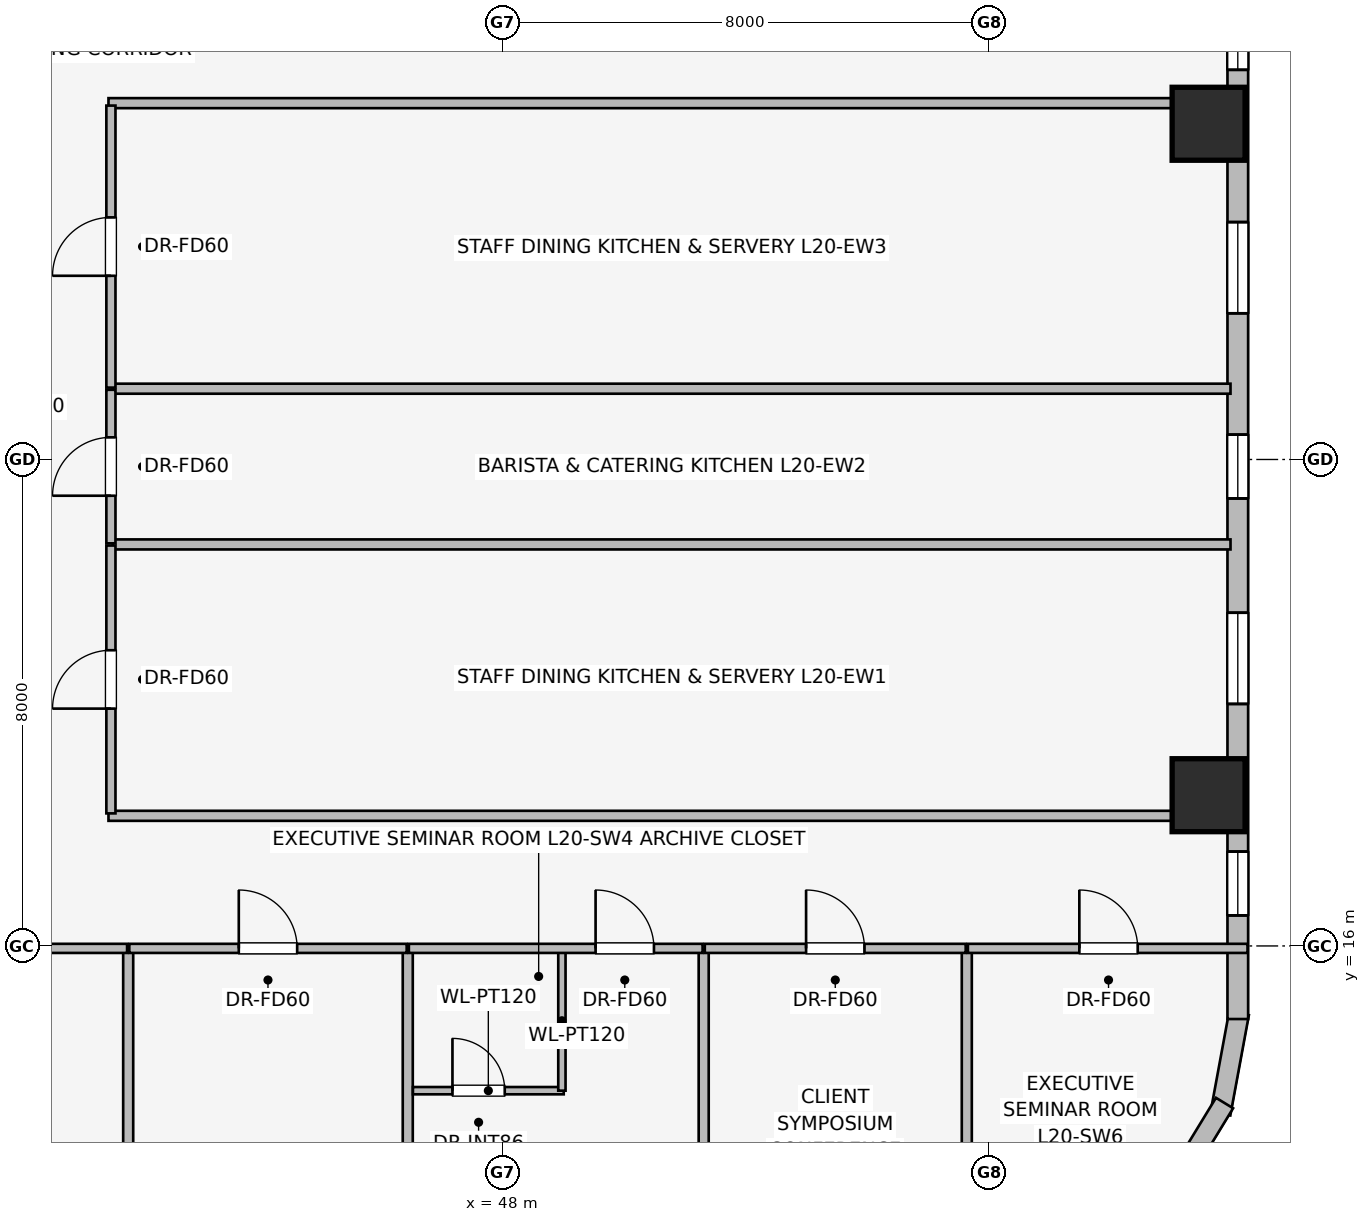
"""IFC4 building model, lengths in metres.
Left out: names, types, materials, properties, quantities, classifications, styles, units other than length and angle.
Written with IfcOpenShell. Run it as: python <this file> out.ifc"""

import sys

from ifc_helpers import new_model, si_unit, direction, frame, frame_2d, origin, origin_2d, place, context, subcontext, project, spatial, rectangle, extrude, element, fill, save


model = new_model("IFC4")
c1 = context("Model", 3, precision=1e-05, world=origin(), true_north=direction((0.0, 1.0)))
c2 = subcontext(c1, "Body", "Model", "MODEL_VIEW")
j1 = project(units=[si_unit("LENGTHUNIT", "METRE"), si_unit("PLANEANGLEUNIT", "RADIAN")], contexts=[c1])
p1 = place(None, origin())
s1 = spatial("IfcSite", under=j1, at=p1, CompositionType="ELEMENT")
p2 = place(p1, origin())
s2 = spatial("IfcBuilding", under=s1, at=p2, CompositionType="ELEMENT")
p3 = place(p2, frame((0.0, 0.0, 78.1)))
s3 = spatial("IfcBuildingStorey", under=s2, at=p3, CompositionType="ELEMENT", Elevation=78.1)
for number, where, z_axis, x_axis in (
    (1, (59.613, 18.479, 0.0), (0.0, 0.0, 1.0), (1.0, 0.0, 0.0)),
    (2, (59.613, 29.521, 0.0), (0.0, 0.0, 1.0), (1.0, 0.0, 0.0)),
):
    element("IfcColumn", number, at=place(p3, frame(where, z_axis=z_axis, x_axis=x_axis)), inside=s3, PredefinedType="COLUMN", context=c2, shape_type="SweptSolid", body=[
        extrude(rectangle(XDim=1.2, YDim=1.2, at=origin_2d()), origin(), (0.0, 0.0, 1.0), 3.65),
    ])
p4 = place(p3, frame((60.113, 14.892, 0.0), z_axis=(0.0, 0.0, 1.0), x_axis=(-0.181714143354, -0.983351397063, 0.0)))
e3 = element("IfcWall", 3, at=p4, inside=s3, PredefinedType="STANDARD", context=c2, shape_type="SweptSolid", body=[
    extrude(rectangle(XDim=1.678, YDim=0.33, at=frame_2d((0.839, 0.0))), origin(), (0.0, 0.0, 1.0), 3.39),
])
p5 = place(p3, frame((59.875, 13.417, 0.0), z_axis=(0.0, 0.0, 1.0), x_axis=(-0.520584129191, -0.853810379671, 0.0)))
e4 = element("IfcWall", 4, at=p5, inside=s3, PredefinedType="STANDARD", context=c2, shape_type="SweptSolid", body=[
    extrude(rectangle(XDim=1.677, YDim=0.33, at=frame_2d((0.838, 0.0))), origin(), (0.0, 0.0, 1.0), 3.39),
])
p6 = place(p3, frame((60.093, 33.202, 0.0), z_axis=(0.0, 0.0, 1.0), x_axis=(0.0, -1.0, 0.0)))
e5 = element("IfcWall", 5, at=p6, inside=s3, PredefinedType="STANDARD", context=c2, shape_type="SweptSolid", body=[
    extrude(rectangle(XDim=18.404, YDim=0.34, at=frame_2d((9.202, 0.0))), origin(), (0.0, 0.0, 1.0), 2.684),
])
p7 = place(p6, frame((1.744, 0.0, 0.75)))
e6 = element("IfcOpeningElement", 6, at=p7, cuts=e5, PredefinedType="OPENING", context=c2, shape_type="SweptSolid", body=[
    extrude(rectangle(XDim=1.05, YDim=1.4, at=frame_2d((0.525, 0.7))), frame((0.0, 0.18, 0.0), z_axis=(0.0, -1.0, 0.0), x_axis=(1.0, 0.0, 0.0)), (0.0, 0.0, 1.0), 0.36),
])
p8 = place(p6, frame((5.298, 0.0, 0.75)))
e7 = element("IfcOpeningElement", 7, at=p8, cuts=e5, PredefinedType="OPENING", context=c2, shape_type="SweptSolid", body=[
    extrude(rectangle(XDim=1.5, YDim=1.5, at=frame_2d((0.75, 0.75))), frame((0.0, 0.18, 0.0), z_axis=(0.0, -1.0, 0.0), x_axis=(1.0, 0.0, 0.0)), (0.0, 0.0, 1.0), 0.36),
])
p9 = place(p6, frame((8.793, 0.0, 0.75)))
e8 = element("IfcOpeningElement", 8, at=p9, cuts=e5, PredefinedType="OPENING", context=c2, shape_type="SweptSolid", body=[
    extrude(rectangle(XDim=1.05, YDim=1.4, at=frame_2d((0.525, 0.7))), frame((0.0, 0.18, 0.0), z_axis=(0.0, -1.0, 0.0), x_axis=(1.0, 0.0, 0.0)), (0.0, 0.0, 1.0), 0.36),
])
p10 = place(p6, frame((11.722, 0.0, 0.75)))
e9 = element("IfcOpeningElement", 9, at=p10, cuts=e5, PredefinedType="OPENING", context=c2, shape_type="SweptSolid", body=[
    extrude(rectangle(XDim=1.5, YDim=1.5, at=frame_2d((0.75, 0.75))), frame((0.0, 0.18, 0.0), z_axis=(0.0, -1.0, 0.0), x_axis=(1.0, 0.0, 0.0)), (0.0, 0.0, 1.0), 0.36),
])
p11 = place(p6, frame((15.65, 0.0, 0.75)))
e10 = element("IfcOpeningElement", 10, at=p11, cuts=e5, PredefinedType="OPENING", context=c2, shape_type="SweptSolid", body=[
    extrude(rectangle(XDim=1.05, YDim=1.4, at=frame_2d((0.525, 0.7))), frame((0.0, 0.18, 0.0), z_axis=(0.0, -1.0, 0.0), x_axis=(1.0, 0.0, 0.0)), (0.0, 0.0, 1.0), 0.36),
])
for number, where, z_axis, x_axis in (
    (11, (41.52, 18.14, 0.0), (0.0, 0.0, 1.0), (1.0, 0.0, 0.0)),
    (12, (41.52, 29.86, 0.0), (0.0, 0.0, 1.0), (1.0, 0.0, 0.0)),
):
    element("IfcWall", number, at=place(p3, frame(where, z_axis=z_axis, x_axis=x_axis)), inside=s3, PredefinedType="PARTITIONING", context=c2, shape_type="SweptSolid", body=[
        extrude(rectangle(XDim=18.453, YDim=0.165, at=frame_2d((9.227, 0.0))), origin(), (0.0, 0.0, 1.0), 3.39),
    ])
for number, where, z_axis, x_axis in (
    (13, (41.59, 22.603, 0.0), (0.0, 0.0, 1.0), (1.0, 0.0, 0.0)),
    (14, (41.59, 25.164, 0.0), (0.0, 0.0, 1.0), (1.0, 0.0, 0.0)),
):
    element("IfcWall", number, at=place(p3, frame(where, z_axis=z_axis, x_axis=x_axis)), inside=s3, PredefinedType="PARTITIONING", context=c2, shape_type="SweptSolid", body=[
        extrude(rectangle(XDim=18.383, YDim=0.165, at=frame_2d((9.191, 0.0))), origin(), (0.0, 0.0, 1.0), 3.39),
    ])
p12 = place(p3, frame((41.56, 18.18, 0.0), z_axis=(0.0, 0.0, 1.0), x_axis=(0.0, 1.0, 0.0)))
e15 = element("IfcWall", 15, at=p12, inside=s3, PredefinedType="PARTITIONING", context=c2, shape_type="SweptSolid", body=[
    extrude(rectangle(XDim=4.405, YDim=0.15, at=frame_2d((2.203, 0.0))), origin(), (0.0, 0.0, 1.0), 3.39),
])
p13 = place(p12, frame((1.723, 0.0, 0.0)))
e16 = element("IfcOpeningElement", 16, at=p13, cuts=e15, PredefinedType="OPENING", context=c2, shape_type="SweptSolid", body=[
    extrude(rectangle(XDim=0.96, YDim=2.0, at=frame_2d((0.48, 1.0))), frame((0.0, 0.085, 0.0), z_axis=(0.0, -1.0, 0.0), x_axis=(1.0, 0.0, 0.0)), (0.0, 0.0, 1.0), 0.17),
])
p14 = place(p3, frame((41.56, 22.621, 0.0), z_axis=(0.0, 0.0, 1.0), x_axis=(0.0, 1.0, 0.0)))
e17 = element("IfcWall", 17, at=p14, inside=s3, PredefinedType="PARTITIONING", context=c2, shape_type="SweptSolid", body=[
    extrude(rectangle(XDim=2.525, YDim=0.15, at=frame_2d((1.262, 0.0))), origin(), (0.0, 0.0, 1.0), 3.39),
])
p15 = place(p14, frame((0.783, 0.0, 0.0)))
e18 = element("IfcOpeningElement", 18, at=p15, cuts=e17, PredefinedType="OPENING", context=c2, shape_type="SweptSolid", body=[
    extrude(rectangle(XDim=0.96, YDim=2.0, at=frame_2d((0.48, 1.0))), frame((0.0, 0.085, 0.0), z_axis=(0.0, -1.0, 0.0), x_axis=(1.0, 0.0, 0.0)), (0.0, 0.0, 1.0), 0.17),
])
p16 = place(p3, frame((41.56, 25.182, 0.0), z_axis=(0.0, 0.0, 1.0), x_axis=(0.0, 1.0, 0.0)))
e19 = element("IfcWall", 19, at=p16, inside=s3, PredefinedType="PARTITIONING", context=c2, shape_type="SweptSolid", body=[
    extrude(rectangle(XDim=4.638, YDim=0.15, at=frame_2d((2.319, 0.0))), origin(), (0.0, 0.0, 1.0), 3.39),
])
p17 = place(p16, frame((1.839, 0.0, 0.0)))
e20 = element("IfcOpeningElement", 20, at=p17, cuts=e19, PredefinedType="OPENING", context=c2, shape_type="SweptSolid", body=[
    extrude(rectangle(XDim=0.96, YDim=2.0, at=frame_2d((0.48, 1.0))), frame((0.0, 0.085, 0.0), z_axis=(0.0, -1.0, 0.0), x_axis=(1.0, 0.0, 0.0)), (0.0, 0.0, 1.0), 0.17),
])
p18 = place(p3, frame((41.844, 3.02, 0.0), z_axis=(0.0, 0.0, 1.0), x_axis=(0.0, 1.0, 0.0)))
e21 = element("IfcWall", 21, at=p18, inside=s3, PredefinedType="PARTITIONING", context=c2, shape_type="SweptSolid", body=[
    extrude(rectangle(XDim=12.91, YDim=0.165, at=frame_2d((6.455, 0.0))), origin(), (0.0, 0.0, 1.0), 2.513),
])
p19 = place(p3, frame((46.442, 5.393, 0.0), z_axis=(0.0, 0.0, 1.0), x_axis=(0.0, 1.0, 0.0)))
e22 = element("IfcWall", 22, at=p19, inside=s3, PredefinedType="PARTITIONING", context=c2, shape_type="SweptSolid", body=[
    extrude(rectangle(XDim=10.537, YDim=0.165, at=frame_2d((5.269, 0.0))), origin(), (0.0, 0.0, 1.0), 3.39),
])
p20 = place(p3, frame((51.309, 7.905, 0.0), z_axis=(0.0, 0.0, 1.0), x_axis=(0.0, 1.0, 0.0)))
e23 = element("IfcWall", 23, at=p20, inside=s3, PredefinedType="PARTITIONING", context=c2, shape_type="SweptSolid", body=[
    extrude(rectangle(XDim=8.025, YDim=0.165, at=frame_2d((4.012, 0.0))), origin(), (0.0, 0.0, 1.0), 3.39),
])
p21 = place(p3, frame((55.636, 10.138, 0.0), z_axis=(0.0, 0.0, 1.0), x_axis=(0.0, 1.0, 0.0)))
e24 = element("IfcWall", 24, at=p21, inside=s3, PredefinedType="PARTITIONING", context=c2, shape_type="SweptSolid", body=[
    extrude(rectangle(XDim=5.792, YDim=0.165, at=frame_2d((2.896, 0.0))), origin(), (0.0, 0.0, 1.0), 3.39),
])
p22 = place(p3, frame((37.265, 15.96, 0.0), z_axis=(0.0, 0.0, 1.0), x_axis=(1.0, 0.0, 0.0)))
e25 = element("IfcWall", 25, at=p22, inside=s3, PredefinedType="PARTITIONING", context=c2, shape_type="SweptSolid", body=[
    extrude(rectangle(XDim=4.561, YDim=0.15, at=frame_2d((2.281, 0.0))), origin(), (0.0, 0.0, 1.0), 3.39),
])
p23 = place(p22, frame((1.801, 0.0, 0.0)))
e26 = element("IfcOpeningElement", 26, at=p23, cuts=e25, PredefinedType="OPENING", context=c2, shape_type="SweptSolid", body=[
    extrude(rectangle(XDim=0.96, YDim=2.0, at=frame_2d((0.48, 1.0))), frame((0.0, 0.085, 0.0), z_axis=(0.0, -1.0, 0.0), x_axis=(1.0, 0.0, 0.0)), (0.0, 0.0, 1.0), 0.17),
])
p24 = place(p3, frame((41.862, 15.96, 0.0), z_axis=(0.0, 0.0, 1.0), x_axis=(1.0, 0.0, 0.0)))
e27 = element("IfcWall", 27, at=p24, inside=s3, PredefinedType="PARTITIONING", context=c2, shape_type="SweptSolid", body=[
    extrude(rectangle(XDim=4.562, YDim=0.15, at=frame_2d((2.281, 0.0))), origin(), (0.0, 0.0, 1.0), 3.39),
])
p25 = place(p24, frame((1.801, 0.0, 0.0)))
e28 = element("IfcOpeningElement", 28, at=p25, cuts=e27, PredefinedType="OPENING", context=c2, shape_type="SweptSolid", body=[
    extrude(rectangle(XDim=0.96, YDim=2.0, at=frame_2d((0.48, 1.0))), frame((0.0, 0.085, 0.0), z_axis=(0.0, -1.0, 0.0), x_axis=(1.0, 0.0, 0.0)), (0.0, 0.0, 1.0), 0.17),
])
p26 = place(p3, frame((46.527, 13.62, 0.0), z_axis=(0.0, 0.0, 1.0), x_axis=(1.0, 0.0, 0.0)))
e29 = element("IfcWall", 29, at=p26, inside=s3, PredefinedType="PARTITIONING", context=c2, shape_type="SweptSolid", body=[
    extrude(rectangle(XDim=2.48, YDim=0.12, at=frame_2d((1.24, 0.0))), origin(), (0.0, 0.0, 1.0), 3.39),
])
p27 = place(p26, frame((0.65, 0.0, 0.0)))
e30 = element("IfcOpeningElement", 30, at=p27, cuts=e29, PredefinedType="OPENING", context=c2, shape_type="SweptSolid", body=[
    extrude(rectangle(XDim=0.86, YDim=2.0, at=frame_2d((0.43, 1.0))), frame((0.0, 0.07, 0.0), z_axis=(0.0, -1.0, 0.0), x_axis=(1.0, 0.0, 0.0)), (0.0, 0.0, 1.0), 0.14),
])
p28 = place(p3, frame((48.977, 13.62, 0.0), z_axis=(0.0, 0.0, 1.0), x_axis=(0.0, 1.0, 0.0)))
e31 = element("IfcWall", 31, at=p28, inside=s3, PredefinedType="PARTITIONING", context=c2, shape_type="SweptSolid", body=[
    extrude(rectangle(XDim=2.3, YDim=0.12, at=frame_2d((1.15, 0.0))), origin(), (0.0, 0.0, 1.0), 3.39),
])
p29 = place(p3, frame((46.46, 15.96, 0.0), z_axis=(0.0, 0.0, 1.0), x_axis=(1.0, 0.0, 0.0)))
e32 = element("IfcWall", 32, at=p29, inside=s3, PredefinedType="PARTITIONING", context=c2, shape_type="SweptSolid", body=[
    extrude(rectangle(XDim=4.831, YDim=0.15, at=frame_2d((2.416, 0.0))), origin(), (0.0, 0.0, 1.0), 3.39),
])
p30 = place(p29, frame((3.071, 0.0, 0.0)))
e33 = element("IfcOpeningElement", 33, at=p30, cuts=e32, PredefinedType="OPENING", context=c2, shape_type="SweptSolid", body=[
    extrude(rectangle(XDim=0.96, YDim=2.0, at=frame_2d((0.48, 1.0))), frame((0.0, 0.085, 0.0), z_axis=(0.0, -1.0, 0.0), x_axis=(1.0, 0.0, 0.0)), (0.0, 0.0, 1.0), 0.17),
])
p31 = place(p3, frame((51.327, 15.96, 0.0), z_axis=(0.0, 0.0, 1.0), x_axis=(1.0, 0.0, 0.0)))
e34 = element("IfcWall", 34, at=p31, inside=s3, PredefinedType="PARTITIONING", context=c2, shape_type="SweptSolid", body=[
    extrude(rectangle(XDim=4.291, YDim=0.15, at=frame_2d((2.146, 0.0))), origin(), (0.0, 0.0, 1.0), 3.39),
])
p32 = place(p31, frame((1.666, 0.0, 0.0)))
e35 = element("IfcOpeningElement", 35, at=p32, cuts=e34, PredefinedType="OPENING", context=c2, shape_type="SweptSolid", body=[
    extrude(rectangle(XDim=0.96, YDim=2.0, at=frame_2d((0.48, 1.0))), frame((0.0, 0.085, 0.0), z_axis=(0.0, -1.0, 0.0), x_axis=(1.0, 0.0, 0.0)), (0.0, 0.0, 1.0), 0.17),
])
p33 = place(p3, frame((55.654, 15.96, 0.0), z_axis=(0.0, 0.0, 1.0), x_axis=(1.0, 0.0, 0.0)))
e36 = element("IfcWall", 36, at=p33, inside=s3, PredefinedType="PARTITIONING", context=c2, shape_type="SweptSolid", body=[
    extrude(rectangle(XDim=4.599, YDim=0.15, at=frame_2d((2.299, 0.0))), origin(), (0.0, 0.0, 1.0), 3.39),
])
p34 = place(p33, frame((1.833, 0.0, 0.0)))
e37 = element("IfcOpeningElement", 37, at=p34, cuts=e36, PredefinedType="OPENING", context=c2, shape_type="SweptSolid", body=[
    extrude(rectangle(XDim=0.96, YDim=2.0, at=frame_2d((0.48, 1.0))), frame((0.0, 0.085, 0.0), z_axis=(0.0, -1.0, 0.0), x_axis=(1.0, 0.0, 0.0)), (0.0, 0.0, 1.0), 0.17),
])
p35 = place(p7, origin())
e38 = element("IfcWindow", 38, at=p35, inside=s3, PartitioningType="SINGLE_PANEL", PredefinedType="WINDOW", context=c2, shape_type="SweptSolid", body=[
    extrude(rectangle(XDim=1.05, YDim=1.4, at=frame_2d((0.525, 0.7))), frame((0.0, 0.03, 0.0), z_axis=(0.0, -1.0, 0.0), x_axis=(1.0, 0.0, 0.0)), (0.0, 0.0, 1.0), 0.06),
])
fill(e6, e38)
p36 = place(p8, origin())
e39 = element("IfcWindow", 39, at=p36, inside=s3, PartitioningType="SINGLE_PANEL", PredefinedType="WINDOW", context=c2, shape_type="SweptSolid", body=[
    extrude(rectangle(XDim=1.5, YDim=1.5, at=frame_2d((0.75, 0.75))), frame((0.0, 0.03, 0.0), z_axis=(0.0, -1.0, 0.0), x_axis=(1.0, 0.0, 0.0)), (0.0, 0.0, 1.0), 0.06),
])
fill(e7, e39)
p37 = place(p9, origin())
e40 = element("IfcWindow", 40, at=p37, inside=s3, PartitioningType="SINGLE_PANEL", PredefinedType="WINDOW", context=c2, shape_type="SweptSolid", body=[
    extrude(rectangle(XDim=1.05, YDim=1.4, at=frame_2d((0.525, 0.7))), frame((0.0, 0.03, 0.0), z_axis=(0.0, -1.0, 0.0), x_axis=(1.0, 0.0, 0.0)), (0.0, 0.0, 1.0), 0.06),
])
fill(e8, e40)
p38 = place(p10, origin())
e41 = element("IfcWindow", 41, at=p38, inside=s3, PartitioningType="SINGLE_PANEL", PredefinedType="WINDOW", context=c2, shape_type="SweptSolid", body=[
    extrude(rectangle(XDim=1.5, YDim=1.5, at=frame_2d((0.75, 0.75))), frame((0.0, 0.03, 0.0), z_axis=(0.0, -1.0, 0.0), x_axis=(1.0, 0.0, 0.0)), (0.0, 0.0, 1.0), 0.06),
])
fill(e9, e41)
p39 = place(p11, origin())
e42 = element("IfcWindow", 42, at=p39, inside=s3, PartitioningType="SINGLE_PANEL", PredefinedType="WINDOW", context=c2, shape_type="SweptSolid", body=[
    extrude(rectangle(XDim=1.05, YDim=1.4, at=frame_2d((0.525, 0.7))), frame((0.0, 0.03, 0.0), z_axis=(0.0, -1.0, 0.0), x_axis=(1.0, 0.0, 0.0)), (0.0, 0.0, 1.0), 0.06),
])
fill(e10, e42)
p40 = place(p13, origin())
e43 = element("IfcDoor", 43, at=p40, inside=s3, OperationType="SINGLE_SWING_LEFT", PredefinedType="DOOR", context=c2, shape_type="SweptSolid", body=[
    extrude(rectangle(XDim=0.96, YDim=2.0, at=frame_2d((0.48, 1.0))), frame((0.0, 0.025, 0.0), z_axis=(0.0, -1.0, 0.0), x_axis=(1.0, 0.0, 0.0)), (0.0, 0.0, 1.0), 0.05),
])
fill(e16, e43)
p41 = place(p15, origin())
e44 = element("IfcDoor", 44, at=p41, inside=s3, OperationType="SINGLE_SWING_LEFT", PredefinedType="DOOR", context=c2, shape_type="SweptSolid", body=[
    extrude(rectangle(XDim=0.96, YDim=2.0, at=frame_2d((0.48, 1.0))), frame((0.0, 0.025, 0.0), z_axis=(0.0, -1.0, 0.0), x_axis=(1.0, 0.0, 0.0)), (0.0, 0.0, 1.0), 0.05),
])
fill(e18, e44)
p42 = place(p17, origin())
e45 = element("IfcDoor", 45, at=p42, inside=s3, OperationType="SINGLE_SWING_LEFT", PredefinedType="DOOR", context=c2, shape_type="SweptSolid", body=[
    extrude(rectangle(XDim=0.96, YDim=2.0, at=frame_2d((0.48, 1.0))), frame((0.0, 0.025, 0.0), z_axis=(0.0, -1.0, 0.0), x_axis=(1.0, 0.0, 0.0)), (0.0, 0.0, 1.0), 0.05),
])
fill(e20, e45)
p43 = place(p25, origin())
e46 = element("IfcDoor", 46, at=p43, inside=s3, OperationType="SINGLE_SWING_LEFT", PredefinedType="DOOR", context=c2, shape_type="SweptSolid", body=[
    extrude(rectangle(XDim=0.96, YDim=2.0, at=frame_2d((0.48, 1.0))), frame((0.0, 0.025, 0.0), z_axis=(0.0, -1.0, 0.0), x_axis=(1.0, 0.0, 0.0)), (0.0, 0.0, 1.0), 0.05),
])
fill(e28, e46)
p44 = place(p27, origin())
e47 = element("IfcDoor", 47, at=p44, inside=s3, OperationType="SINGLE_SWING_LEFT", PredefinedType="DOOR", context=c2, shape_type="SweptSolid", body=[
    extrude(rectangle(XDim=0.86, YDim=2.0, at=frame_2d((0.43, 1.0))), frame((0.0, 0.025, 0.0), z_axis=(0.0, -1.0, 0.0), x_axis=(1.0, 0.0, 0.0)), (0.0, 0.0, 1.0), 0.05),
])
fill(e30, e47)
p45 = place(p30, origin())
e48 = element("IfcDoor", 48, at=p45, inside=s3, OperationType="SINGLE_SWING_LEFT", PredefinedType="DOOR", context=c2, shape_type="SweptSolid", body=[
    extrude(rectangle(XDim=0.96, YDim=2.0, at=frame_2d((0.48, 1.0))), frame((0.0, 0.025, 0.0), z_axis=(0.0, -1.0, 0.0), x_axis=(1.0, 0.0, 0.0)), (0.0, 0.0, 1.0), 0.05),
])
fill(e33, e48)
p46 = place(p32, origin())
e49 = element("IfcDoor", 49, at=p46, inside=s3, OperationType="SINGLE_SWING_LEFT", PredefinedType="DOOR", context=c2, shape_type="SweptSolid", body=[
    extrude(rectangle(XDim=0.96, YDim=2.0, at=frame_2d((0.48, 1.0))), frame((0.0, 0.025, 0.0), z_axis=(0.0, -1.0, 0.0), x_axis=(1.0, 0.0, 0.0)), (0.0, 0.0, 1.0), 0.05),
])
fill(e35, e49)
p47 = place(p34, origin())
e50 = element("IfcDoor", 50, at=p47, inside=s3, OperationType="SINGLE_SWING_LEFT", PredefinedType="DOOR", context=c2, shape_type="SweptSolid", body=[
    extrude(rectangle(XDim=0.96, YDim=2.0, at=frame_2d((0.48, 1.0))), frame((0.0, 0.025, 0.0), z_axis=(0.0, -1.0, 0.0), x_axis=(1.0, 0.0, 0.0)), (0.0, 0.0, 1.0), 0.05),
])
fill(e37, e50)
save(model, sys.argv[1])
